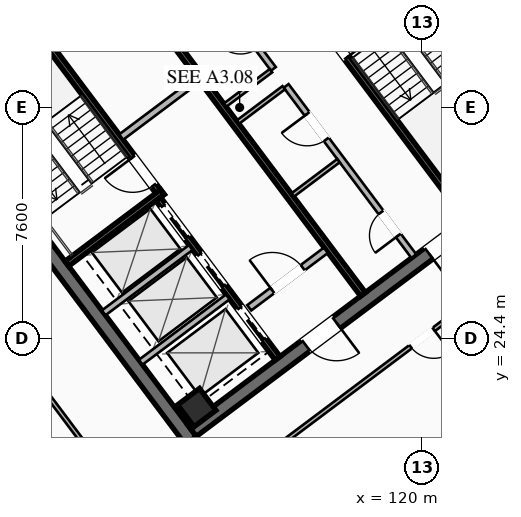
"""IFC4 building model, lengths in metres.
Left out: names, types, materials, properties, quantities, classifications, styles, units other than length and angle.
Written with IfcOpenShell. Run it as: python <this file> out.ifc"""

import sys

from ifc_helpers import new_model, si_unit, direction, frame, frame_2d, origin, origin_2d, place, context, subcontext, project, spatial, rectangle, hollow_rectangle, extrude, element, fill, save


model = new_model("IFC4")
c1 = context("Model", 3, precision=1e-05, world=origin(), true_north=direction((0.0, 1.0)))
c2 = subcontext(c1, "Body", "Model", "MODEL_VIEW")
j1 = project(units=[si_unit("LENGTHUNIT", "METRE"), si_unit("PLANEANGLEUNIT", "RADIAN")], contexts=[c1])
p1 = place(None, origin())
s1 = spatial("IfcSite", under=j1, at=p1, CompositionType="ELEMENT")
p2 = place(p1, origin())
s2 = spatial("IfcBuilding", under=s1, at=p2, CompositionType="ELEMENT")
p3 = place(p2, frame((0.0, 0.0, 221.95)))
s3 = spatial("IfcBuildingStorey", under=s2, at=p3, CompositionType="ELEMENT", Elevation=221.95)
for number, where, z_axis, x_axis in (
    (1, (112.396, 21.047, 0.0), (0.0, 0.0, 1.0), (-0.6, 0.8, 0.0)),
    (2, (115.604, 42.953, 0.0), (0.0, 0.0, 1.0), (0.6, -0.8, 0.0)),
):
    element("IfcWall", number, at=place(p3, frame(where, z_axis=z_axis, x_axis=x_axis)), inside=s3, PredefinedType="SHEAR", context=c2, shape_type="SweptSolid", body=[
        extrude(rectangle(XDim=15.6, YDim=0.45, at=frame_2d((7.8, 0.0))), origin(), (0.0, 0.0, 1.0), 3.55),
    ])
p4 = place(p3, frame((124.649, 30.518, 0.0), z_axis=(0.0, 0.0, 1.0), x_axis=(-0.8, -0.6, 0.0)))
e3 = element("IfcWall", 3, at=p4, inside=s3, PredefinedType="SHEAR", context=c2, shape_type="SweptSolid", body=[
    extrude(rectangle(XDim=15.26, YDim=0.45, at=frame_2d((7.63, 0.0))), origin(), (0.0, 0.0, 1.0), 3.55),
])
p5 = place(p4, frame((9.33, 0.0, 0.0)))
e4 = element("IfcOpeningElement", 4, at=p5, cuts=e3, PredefinedType="OPENING", context=c2, shape_type="SweptSolid", body=[
    extrude(rectangle(XDim=1.25, YDim=2.25, at=frame_2d((0.625, 1.125))), frame((0.0, 0.235, 0.0), z_axis=(0.0, -1.0, 0.0), x_axis=(1.0, 0.0, 0.0)), (0.0, 0.0, 1.0), 0.47),
])
p6 = place(p4, frame((4.28, 0.0, 0.0)))
e5 = element("IfcOpeningElement", 5, at=p6, cuts=e3, PredefinedType="OPENING", context=c2, shape_type="SweptSolid", body=[
    extrude(rectangle(XDim=1.25, YDim=2.25, at=frame_2d((0.625, 1.125))), frame((0.0, 0.235, 0.0), z_axis=(0.0, -1.0, 0.0), x_axis=(1.0, 0.0, 0.0)), (0.0, 0.0, 1.0), 0.47),
])
p7 = place(p3, frame((103.351, 33.482, 0.0), z_axis=(0.0, 0.0, 1.0), x_axis=(0.8, 0.6, 0.0)))
e6 = element("IfcWall", 6, at=p7, inside=s3, PredefinedType="SHEAR", context=c2, shape_type="SweptSolid", body=[
    extrude(rectangle(XDim=15.26, YDim=0.45, at=frame_2d((7.63, 0.0))), origin(), (0.0, 0.0, 1.0), 3.55),
])
p8 = place(p7, frame((4.68, 0.0, 0.0)))
e7 = element("IfcOpeningElement", 7, at=p8, cuts=e6, PredefinedType="OPENING", context=c2, shape_type="SweptSolid", body=[
    extrude(rectangle(XDim=1.25, YDim=2.25, at=frame_2d((0.625, 1.125))), frame((0.0, 0.235, 0.0), z_axis=(0.0, -1.0, 0.0), x_axis=(1.0, 0.0, 0.0)), (0.0, 0.0, 1.0), 0.47),
])
p9 = place(p7, frame((9.73, 0.0, 0.0)))
e8 = element("IfcOpeningElement", 8, at=p9, cuts=e6, PredefinedType="OPENING", context=c2, shape_type="SweptSolid", body=[
    extrude(rectangle(XDim=1.25, YDim=2.25, at=frame_2d((0.625, 1.125))), frame((0.0, 0.235, 0.0), z_axis=(0.0, -1.0, 0.0), x_axis=(1.0, 0.0, 0.0)), (0.0, 0.0, 1.0), 0.47),
])
p10 = place(p3, frame((112.59, 22.13, 0.0), z_axis=(0.0, 0.0, 1.0), x_axis=(0.799999996291, 0.600000004945, 0.0)))
e9 = element("IfcColumn", 9, at=p10, inside=s3, PredefinedType="COLUMN", context=c2, shape_type="SweptSolid", body=[
    extrude(hollow_rectangle(XDim=0.9, YDim=0.9, WallThickness=0.04, at=origin_2d()), origin(), (0.0, 0.0, 1.0), 3.37),
])
p11 = place(p3, frame((111.44, 29.08, 0.0), z_axis=(0.0, 0.0, 1.0), x_axis=(-0.59999041401, 0.800007189403, 0.0)))
e10 = element("IfcWall", 10, at=p11, inside=s3, PredefinedType="SHEAR", context=c2, shape_type="SweptSolid", body=[
    extrude(rectangle(XDim=8.15, YDim=0.2, at=frame_2d((4.075, 0.0))), origin(), (0.0, 0.0, 1.0), 3.37),
])
p12 = place(p11, frame((0.45, 0.0, 0.0)))
e11 = element("IfcOpeningElement", 11, at=p12, cuts=e10, PredefinedType="OPENING", context=c2, shape_type="SweptSolid", body=[
    extrude(rectangle(XDim=1.15, YDim=2.2, at=frame_2d((0.575, 1.1))), frame((0.0, 0.11, 0.0), z_axis=(0.0, -1.0, 0.0), x_axis=(1.0, 0.0, 0.0)), (0.0, 0.0, 1.0), 0.22),
])
p13 = place(p3, frame((108.316, 26.862, 0.0), z_axis=(0.0, 0.0, 1.0), x_axis=(0.800014909178, 0.599980120581, 0.0)))
e12 = element("IfcWall", 12, at=p13, inside=s3, PredefinedType="SHEAR", context=c2, shape_type="SweptSolid", body=[
    extrude(rectangle(XDim=3.93, YDim=0.2, at=frame_2d((1.965, 0.0))), origin(), (0.0, 0.0, 1.0), 3.37),
])
p14 = place(p3, frame((116.56, 34.92, 0.0), z_axis=(0.0, 0.0, 1.0), x_axis=(0.59999041401, -0.800007189403, 0.0)))
e13 = element("IfcWall", 13, at=p14, inside=s3, PredefinedType="SHEAR", context=c2, shape_type="SweptSolid", body=[
    extrude(rectangle(XDim=8.15, YDim=0.2, at=frame_2d((4.075, 0.0))), origin(), (0.0, 0.0, 1.0), 3.37),
])
p15 = place(p14, frame((0.45, 0.0, 0.0)))
e14 = element("IfcOpeningElement", 14, at=p15, cuts=e13, PredefinedType="OPENING", context=c2, shape_type="SweptSolid", body=[
    extrude(rectangle(XDim=1.15, YDim=2.2, at=frame_2d((0.575, 1.1))), frame((0.0, 0.11, 0.0), z_axis=(0.0, -1.0, 0.0), x_axis=(1.0, 0.0, 0.0)), (0.0, 0.0, 1.0), 0.22),
])
p16 = place(p3, frame((118.058, 25.856, 0.0), z_axis=(0.0, 0.0, 1.0), x_axis=(-0.600002657301, 0.799998007018, 0.0)))
e15 = element("IfcWall", 15, at=p16, inside=s3, PredefinedType="SHEAR", context=c2, shape_type="SweptSolid", body=[
    extrude(rectangle(XDim=14.7, YDim=0.2, at=frame_2d((7.35, 0.0))), origin(), (0.0, 0.0, 1.0), 3.37),
])
p17 = place(p3, frame((110.104, 31.028, 0.0), z_axis=(0.0, 0.0, 1.0), x_axis=(0.800018601094, 0.59997519774, 0.0)))
e16 = element("IfcWall", 16, at=p17, inside=s3, PredefinedType="SOLIDWALL", context=c2, shape_type="SweptSolid", body=[
    extrude(rectangle(XDim=3.15, YDim=0.22, at=frame_2d((1.575, 0.0))), origin(), (0.0, 0.0, 1.0), 2.723),
])
p18 = place(p3, frame((114.316, 25.412, 0.0), z_axis=(0.0, 0.0, 1.0), x_axis=(0.800018601094, 0.59997519774, 0.0)))
e17 = element("IfcWall", 17, at=p18, inside=s3, PredefinedType="SOLIDWALL", context=c2, shape_type="SweptSolid", body=[
    extrude(rectangle(XDim=3.15, YDim=0.22, at=frame_2d((1.575, 0.0))), origin(), (0.0, 0.0, 1.0), 2.723),
])
p19 = place(p18, frame((0.95, 0.0, 0.0)))
e18 = element("IfcOpeningElement", 18, at=p19, cuts=e17, PredefinedType="OPENING", context=c2, shape_type="SweptSolid", body=[
    extrude(rectangle(XDim=1.25, YDim=2.25, at=frame_2d((0.625, 1.125))), frame((0.0, 0.12, 0.0), z_axis=(0.0, -1.0, 0.0), x_axis=(1.0, 0.0, 0.0)), (0.0, 0.0, 1.0), 0.24),
])
p20 = place(p3, frame((115.25, 23.75, 0.0), z_axis=(0.0, 0.0, 1.0), x_axis=(-0.599994036198, 0.800004472816, 0.0)))
e19 = element("IfcWall", 19, at=p20, inside=s3, PredefinedType="SHEAR", context=c2, shape_type="SweptSolid", body=[
    extrude(rectangle(XDim=6.55, YDim=0.2, at=frame_2d((3.275, 0.0))), origin(), (0.0, 0.0, 1.0), 3.37),
])
p21 = place(p20, frame((4.975, 0.0, 0.0)))
e20 = element("IfcOpeningElement", 20, at=p21, cuts=e19, PredefinedType="OPENING", context=c2, shape_type="SweptSolid", body=[
    extrude(rectangle(XDim=1.3, YDim=2.25, at=frame_2d((0.65, 1.125))), frame((0.0, 0.11, 0.0), z_axis=(0.0, -1.0, 0.0), x_axis=(1.0, 0.0, 0.0)), (0.0, 0.0, 1.0), 0.22),
])
p22 = place(p20, frame((2.975, 0.0, 0.0)))
e21 = element("IfcOpeningElement", 21, at=p22, cuts=e19, PredefinedType="OPENING", context=c2, shape_type="SweptSolid", body=[
    extrude(rectangle(XDim=1.3, YDim=2.25, at=frame_2d((0.65, 1.125))), frame((0.0, 0.11, 0.0), z_axis=(0.0, -1.0, 0.0), x_axis=(1.0, 0.0, 0.0)), (0.0, 0.0, 1.0), 0.22),
])
p23 = place(p20, frame((0.775, 0.0, 0.0)))
e22 = element("IfcOpeningElement", 22, at=p23, cuts=e19, PredefinedType="OPENING", context=c2, shape_type="SweptSolid", body=[
    extrude(rectangle(XDim=1.3, YDim=2.25, at=frame_2d((0.65, 1.125))), frame((0.0, 0.11, 0.0), z_axis=(0.0, -1.0, 0.0), x_axis=(1.0, 0.0, 0.0)), (0.0, 0.0, 1.0), 0.22),
])
for number, where, z_axis, x_axis in (
    (23, (110.746, 23.622, 0.0), (0.0, 0.0, 1.0), (0.8, 0.6, 0.0)),
    (24, (109.528, 25.246, 0.0), (0.0, 0.0, 1.0), (0.8, 0.6, 0.0)),
):
    element("IfcWall", number, at=place(p3, frame(where, z_axis=z_axis, x_axis=x_axis)), inside=s3, PredefinedType="SOLIDWALL", context=c2, shape_type="SweptSolid", body=[
        extrude(rectangle(XDim=3.58, YDim=0.2, at=frame_2d((1.79, 0.0))), origin(), (0.0, 0.0, 1.0), 3.37),
    ])
p24 = place(p3, frame((119.73, 27.11, 0.0), z_axis=(0.0, 0.0, 1.0), x_axis=(-0.600005580459, 0.799995814625, 0.0)))
e25 = element("IfcWall", 25, at=p24, inside=s3, PredefinedType="SOLIDWALL", context=c2, shape_type="SweptSolid", body=[
    extrude(rectangle(XDim=7.0, YDim=0.2, at=frame_2d((3.5, 0.0))), origin(), (0.0, 0.0, 1.0), 2.723),
])
p25 = place(p24, frame((0.85, 0.0, 0.0)))
e26 = element("IfcOpeningElement", 26, at=p25, cuts=e25, PredefinedType="OPENING", context=c2, shape_type="SweptSolid", body=[
    extrude(rectangle(XDim=0.95, YDim=2.05, at=frame_2d((0.475, 1.025))), frame((0.0, 0.11, 0.0), z_axis=(0.0, -1.0, 0.0), x_axis=(1.0, 0.0, 0.0)), (0.0, 0.0, 1.0), 0.22),
])
p26 = place(p24, frame((4.8, 0.0, 0.0)))
e27 = element("IfcOpeningElement", 27, at=p26, cuts=e25, PredefinedType="OPENING", context=c2, shape_type="SweptSolid", body=[
    extrude(rectangle(XDim=1.05, YDim=2.2, at=frame_2d((0.525, 1.1))), frame((0.0, 0.11, 0.0), z_axis=(0.0, -1.0, 0.0), x_axis=(1.0, 0.0, 0.0)), (0.0, 0.0, 1.0), 0.22),
])
for number, where, z_axis, x_axis in (
    (28, (113.946, 31.522, 0.0), (0.0, 0.0, 1.0), (0.8, 0.6, 0.0)),
    (29, (115.746, 29.122, 0.0), (0.0, 0.0, 1.0), (0.8, 0.6, 0.0)),
):
    element("IfcWall", number, at=place(p3, frame(where, z_axis=z_axis, x_axis=x_axis)), inside=s3, PredefinedType="PARTITIONING", context=c2, shape_type="SweptSolid", body=[
        extrude(rectangle(XDim=1.88, YDim=0.135, at=frame_2d((0.94, 0.0))), origin(), (0.0, 0.0, 1.0), 2.723),
    ])
p27 = place(p3, frame((115.11, 33.27, 0.0), z_axis=(0.0, 0.0, 1.0), x_axis=(-0.600011160345, 0.79999162962, 0.0)))
e30 = element("IfcWall", 30, at=p27, inside=s3, PredefinedType="SOLIDWALL", context=c2, shape_type="SweptSolid", body=[
    extrude(rectangle(XDim=7.0, YDim=0.2, at=frame_2d((3.5, 0.0))), origin(), (0.0, 0.0, 1.0), 2.723),
])
p28 = place(p27, frame((0.85, 0.0, 0.0)))
e31 = element("IfcOpeningElement", 31, at=p28, cuts=e30, PredefinedType="OPENING", context=c2, shape_type="SweptSolid", body=[
    extrude(rectangle(XDim=0.95, YDim=2.05, at=frame_2d((0.475, 1.025))), frame((0.0, 0.11, 0.0), z_axis=(0.0, -1.0, 0.0), x_axis=(1.0, 0.0, 0.0)), (0.0, 0.0, 1.0), 0.22),
])
p29 = place(p27, frame((4.85, 0.0, 0.0)))
e32 = element("IfcOpeningElement", 32, at=p29, cuts=e30, PredefinedType="OPENING", context=c2, shape_type="SweptSolid", body=[
    extrude(rectangle(XDim=0.95, YDim=2.05, at=frame_2d((0.475, 1.025))), frame((0.0, 0.11, 0.0), z_axis=(0.0, -1.0, 0.0), x_axis=(1.0, 0.0, 0.0)), (0.0, 0.0, 1.0), 0.22),
])
p30 = place(p3, frame((113.526, 32.082, 0.0), z_axis=(0.0, 0.0, 1.0), x_axis=(0.800046745961, 0.599937666993, 0.0)))
e33 = element("IfcWall", 33, at=p30, inside=s3, PredefinedType="PARTITIONING", context=c2, shape_type="SweptSolid", body=[
    extrude(rectangle(XDim=1.88, YDim=0.135, at=frame_2d((0.94, 0.0))), origin(), (0.0, 0.0, 1.0), 2.723),
])
p31 = place(p3, frame((123.322, 26.904, 0.0), z_axis=(0.0, 0.0, 1.0), x_axis=(-0.799996127317, -0.600005163543, 0.0)))
e34 = element("IfcWall", 34, at=p31, inside=s3, PredefinedType="PARTITIONING", context=c2, shape_type="SweptSolid", body=[
    extrude(rectangle(XDim=15.13, YDim=0.135, at=frame_2d((7.565, 0.0))), origin(), (0.0, 0.0, 1.0), 2.723),
])
p32 = place(p31, frame((13.8, 0.0, 0.0)))
e35 = element("IfcOpeningElement", 35, at=p32, cuts=e34, PredefinedType="OPENING", context=c2, shape_type="SweptSolid", body=[
    extrude(rectangle(XDim=0.95, YDim=2.05, at=frame_2d((0.475, 1.025))), frame((0.0, 0.077, 0.0), z_axis=(0.0, -1.0, 0.0), x_axis=(1.0, 0.0, 0.0)), (0.0, 0.0, 1.0), 0.155),
])
p33 = place(p31, frame((3.672, 0.0, 0.0)))
e36 = element("IfcOpeningElement", 36, at=p33, cuts=e34, PredefinedType="OPENING", context=c2, shape_type="SweptSolid", body=[
    extrude(rectangle(XDim=0.95, YDim=2.05, at=frame_2d((0.475, 1.025))), frame((0.0, 0.077, 0.0), z_axis=(0.0, -1.0, 0.0), x_axis=(1.0, 0.0, 0.0)), (0.0, 0.0, 1.0), 0.155),
])
p34 = place(p3, frame((111.17, 17.89, 0.0), z_axis=(0.0, 0.0, 1.0), x_axis=(-0.599998113842, 0.800001414615, 0.0)))
e37 = element("IfcWall", 37, at=p34, inside=s3, PredefinedType="PARTITIONING", context=c2, shape_type="SweptSolid", body=[
    extrude(rectangle(XDim=20.71, YDim=0.135, at=frame_2d((10.355, 0.0))), origin(), (0.0, 0.0, 1.0), 2.723),
])
p35 = place(p34, frame((19.46, 0.0, 0.0)))
e38 = element("IfcOpeningElement", 38, at=p35, cuts=e37, PredefinedType="OPENING", context=c2, shape_type="SweptSolid", body=[
    extrude(rectangle(XDim=0.95, YDim=2.05, at=frame_2d((0.475, 1.025))), frame((0.0, 0.077, 0.0), z_axis=(0.0, -1.0, 0.0), x_axis=(1.0, 0.0, 0.0)), (0.0, 0.0, 1.0), 0.155),
])
p36 = place(p5, origin())
e39 = element("IfcDoor", 39, at=p36, inside=s3, OperationType="SINGLE_SWING_LEFT", PredefinedType="DOOR", context=c2, shape_type="SweptSolid", body=[
    extrude(rectangle(XDim=1.25, YDim=2.25, at=frame_2d((0.625, 1.125))), frame((0.0, 0.025, 0.0), z_axis=(0.0, -1.0, 0.0), x_axis=(1.0, 0.0, 0.0)), (0.0, 0.0, 1.0), 0.05),
])
fill(e4, e39)
p37 = place(p6, origin())
e40 = element("IfcDoor", 40, at=p37, inside=s3, OperationType="SINGLE_SWING_RIGHT", PredefinedType="DOOR", context=c2, shape_type="SweptSolid", body=[
    extrude(rectangle(XDim=1.25, YDim=2.25, at=frame_2d((0.625, 1.125))), frame((0.0, 0.025, 0.0), z_axis=(0.0, -1.0, 0.0), x_axis=(1.0, 0.0, 0.0)), (0.0, 0.0, 1.0), 0.05),
])
fill(e5, e40)
p38 = place(p12, origin())
e41 = element("IfcDoor", 41, at=p38, inside=s3, OperationType="SINGLE_SWING_RIGHT", PredefinedType="DOOR", context=c2, shape_type="SweptSolid", body=[
    extrude(rectangle(XDim=1.15, YDim=2.2, at=frame_2d((0.575, 1.1))), frame((0.0, 0.025, 0.0), z_axis=(0.0, -1.0, 0.0), x_axis=(1.0, 0.0, 0.0)), (0.0, 0.0, 1.0), 0.05),
])
fill(e11, e41)
p39 = place(p15, origin())
e42 = element("IfcDoor", 42, at=p39, inside=s3, OperationType="SINGLE_SWING_RIGHT", PredefinedType="DOOR", context=c2, shape_type="SweptSolid", body=[
    extrude(rectangle(XDim=1.15, YDim=2.2, at=frame_2d((0.575, 1.1))), frame((0.0, 0.025, 0.0), z_axis=(0.0, -1.0, 0.0), x_axis=(1.0, 0.0, 0.0)), (0.0, 0.0, 1.0), 0.05),
])
fill(e14, e42)
p40 = place(p19, origin())
e43 = element("IfcDoor", 43, at=p40, inside=s3, OperationType="SINGLE_SWING_LEFT", PredefinedType="DOOR", context=c2, shape_type="SweptSolid", body=[
    extrude(rectangle(XDim=1.25, YDim=2.25, at=frame_2d((0.625, 1.125))), frame((0.0, 0.025, 0.0), z_axis=(0.0, -1.0, 0.0), x_axis=(1.0, 0.0, 0.0)), (0.0, 0.0, 1.0), 0.05),
])
fill(e18, e43)
p41 = place(p25, origin())
e44 = element("IfcDoor", 44, at=p41, inside=s3, OperationType="SINGLE_SWING_LEFT", PredefinedType="DOOR", context=c2, shape_type="SweptSolid", body=[
    extrude(rectangle(XDim=0.95, YDim=2.05, at=frame_2d((0.475, 1.025))), frame((0.0, 0.025, 0.0), z_axis=(0.0, -1.0, 0.0), x_axis=(1.0, 0.0, 0.0)), (0.0, 0.0, 1.0), 0.05),
])
fill(e26, e44)
p42 = place(p26, origin())
e45 = element("IfcDoor", 45, at=p42, inside=s3, OperationType="SINGLE_SWING_RIGHT", PredefinedType="DOOR", context=c2, shape_type="SweptSolid", body=[
    extrude(rectangle(XDim=1.05, YDim=2.2, at=frame_2d((0.525, 1.1))), frame((0.0, 0.025, 0.0), z_axis=(0.0, -1.0, 0.0), x_axis=(1.0, 0.0, 0.0)), (0.0, 0.0, 1.0), 0.05),
])
fill(e27, e45)
p43 = place(p33, origin())
e46 = element("IfcDoor", 46, at=p43, inside=s3, OperationType="SINGLE_SWING_LEFT", PredefinedType="DOOR", context=c2, shape_type="SweptSolid", body=[
    extrude(rectangle(XDim=0.95, YDim=2.05, at=frame_2d((0.475, 1.025))), frame((0.0, 0.025, 0.0), z_axis=(0.0, -1.0, 0.0), x_axis=(1.0, 0.0, 0.0)), (0.0, 0.0, 1.0), 0.05),
])
fill(e36, e46)
p44 = place(p21, origin())
e47 = element("IfcDoor", 47, at=p44, inside=s3, OperationType="SLIDING_TO_LEFT", PredefinedType="DOOR", context=c2, shape_type="SweptSolid", body=[
    extrude(rectangle(XDim=1.3, YDim=2.25, at=frame_2d((0.65, 1.125))), frame((0.0, 0.025, 0.0), z_axis=(0.0, -1.0, 0.0), x_axis=(1.0, 0.0, 0.0)), (0.0, 0.0, 1.0), 0.05),
])
fill(e20, e47)
p45 = place(p22, origin())
e48 = element("IfcDoor", 48, at=p45, inside=s3, OperationType="SLIDING_TO_LEFT", PredefinedType="DOOR", context=c2, shape_type="SweptSolid", body=[
    extrude(rectangle(XDim=1.3, YDim=2.25, at=frame_2d((0.65, 1.125))), frame((0.0, 0.025, 0.0), z_axis=(0.0, -1.0, 0.0), x_axis=(1.0, 0.0, 0.0)), (0.0, 0.0, 1.0), 0.05),
])
fill(e21, e48)
p46 = place(p23, origin())
e49 = element("IfcDoor", 49, at=p46, inside=s3, OperationType="SLIDING_TO_LEFT", PredefinedType="DOOR", context=c2, shape_type="SweptSolid", body=[
    extrude(rectangle(XDim=1.3, YDim=2.25, at=frame_2d((0.65, 1.125))), frame((0.0, 0.025, 0.0), z_axis=(0.0, -1.0, 0.0), x_axis=(1.0, 0.0, 0.0)), (0.0, 0.0, 1.0), 0.05),
])
fill(e22, e49)
save(model, sys.argv[1])
